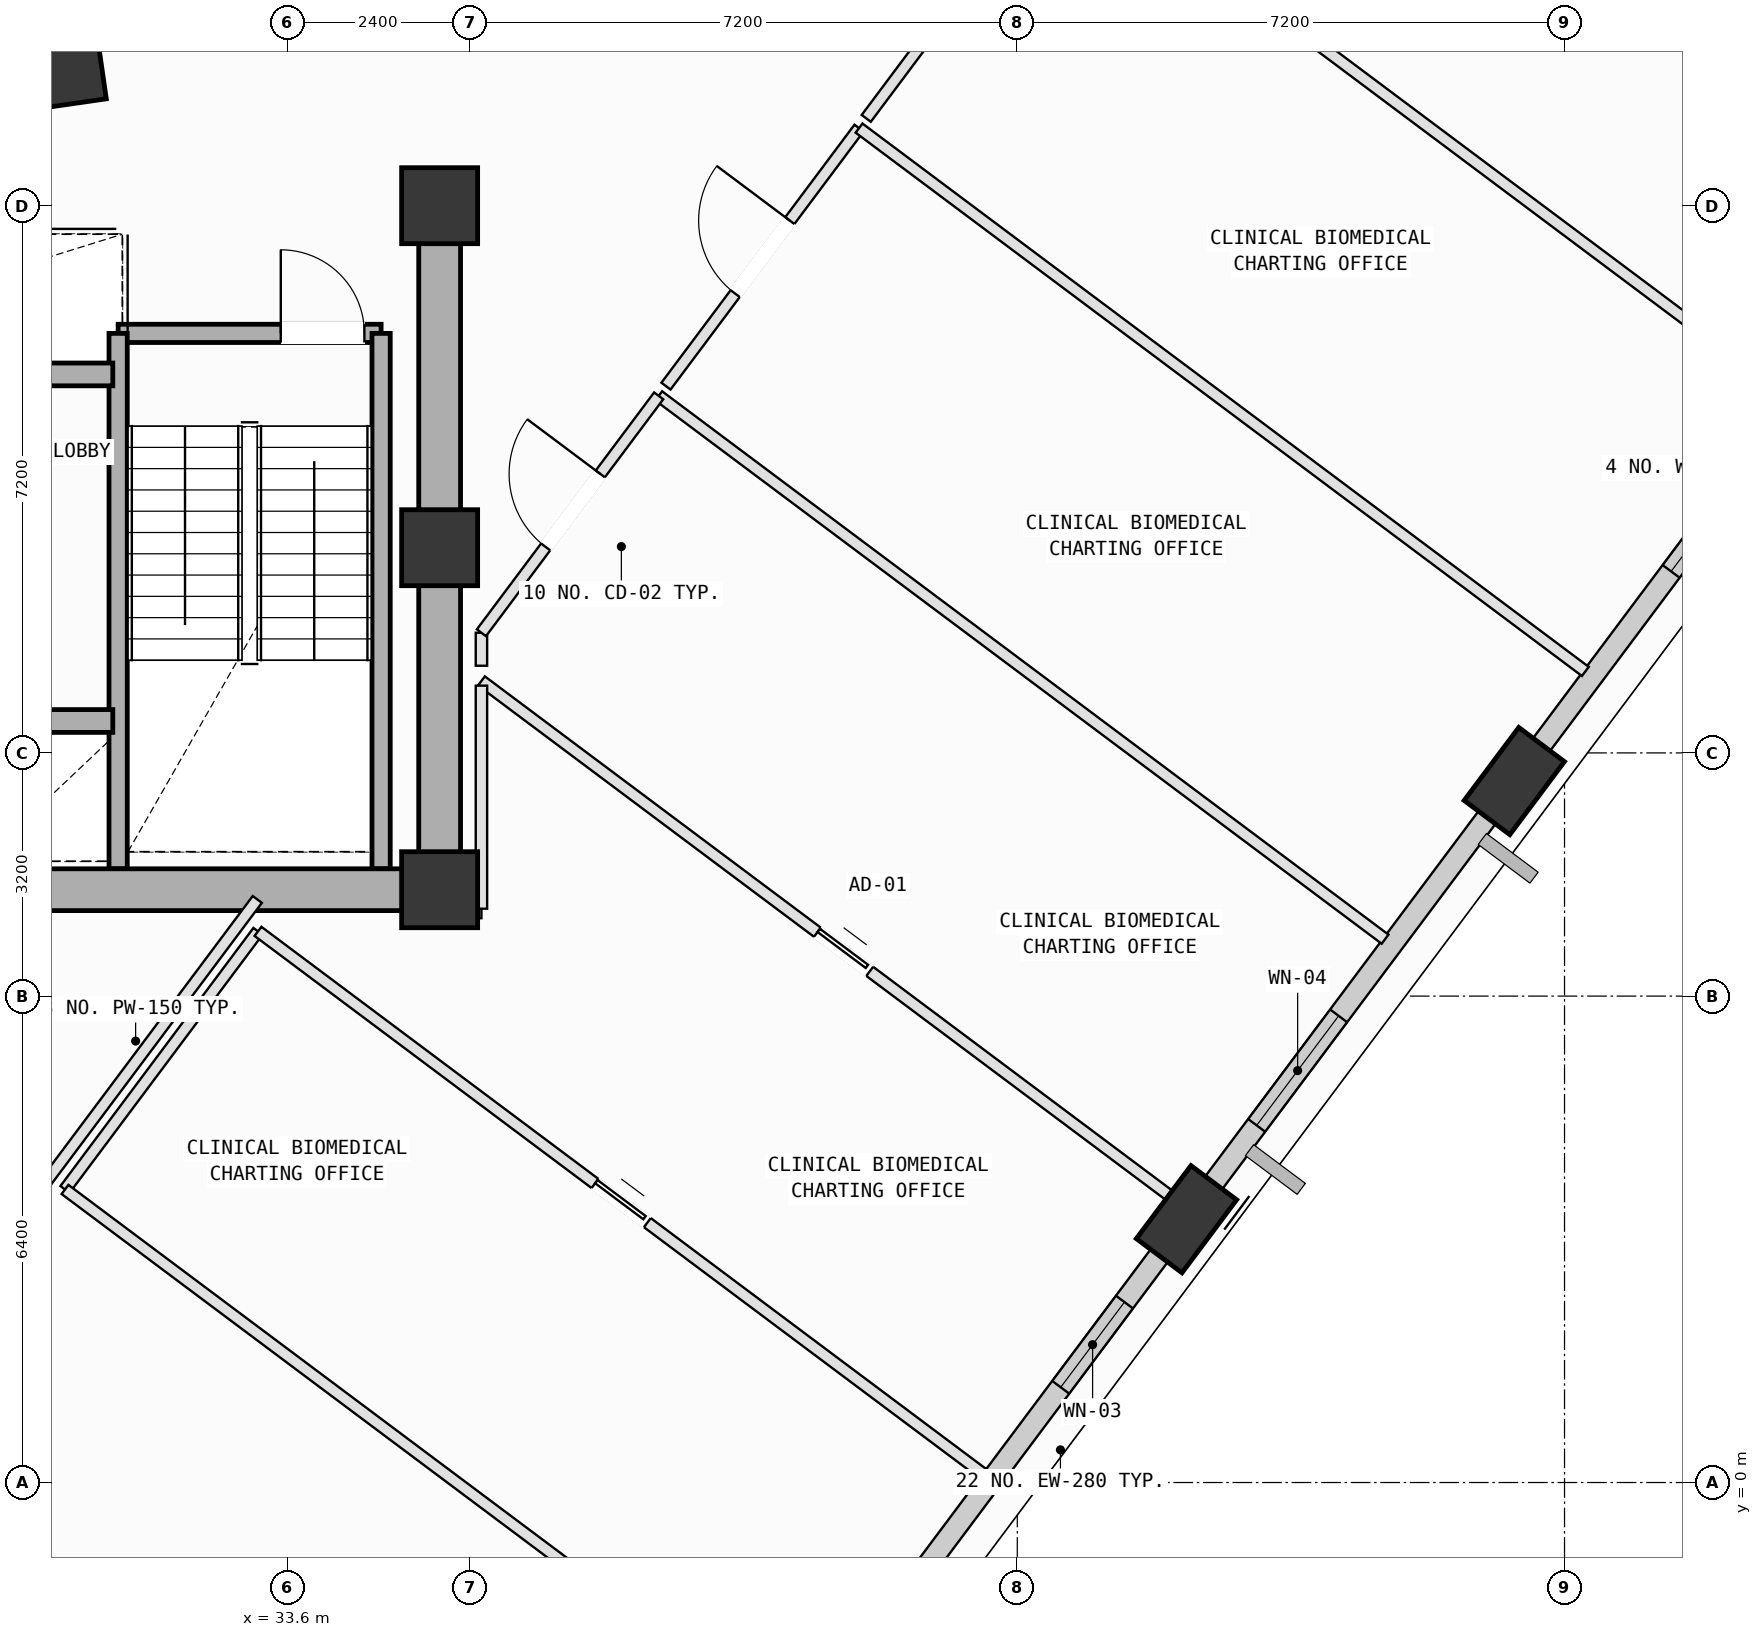
"""IFC4 building model, lengths in metres.
Left out: names, types, materials, properties, quantities, classifications, styles, units other than length and angle.
Written with IfcOpenShell. Run it as: python <this file> out.ifc"""

import sys

from ifc_helpers import new_model, si_unit, direction, frame, frame_2d, origin, origin_2d, place, context, subcontext, project, spatial, rectangle, extrude, element, fill, save


model = new_model("IFC4")
c1 = context("Model", 3, precision=1e-05, world=origin(), true_north=direction((0.0, 1.0)))
c2 = subcontext(c1, "Body", "Model", "MODEL_VIEW")
j1 = project(units=[si_unit("LENGTHUNIT", "METRE"), si_unit("PLANEANGLEUNIT", "RADIAN")], contexts=[c1])
p1 = place(None, origin())
s1 = spatial("IfcSite", under=j1, at=p1, CompositionType="ELEMENT")
p2 = place(p1, origin())
s2 = spatial("IfcBuilding", under=s1, at=p2, CompositionType="ELEMENT")
p3 = place(p2, frame((0.0, 0.0, 251.2)))
s3 = spatial("IfcBuildingStorey", under=s2, at=p3, CompositionType="ELEMENT", Elevation=251.2)
for number, where, z_axis, x_axis in (
    (1, (35.6, 7.8, 0.0), (0.0, 0.0, 1.0), (1.0, 0.0, 0.0)),
    (2, (35.6, 12.3, 0.0), (0.0, 0.0, 1.0), (1.0, 0.0, 0.0)),
    (3, (35.6, 16.8, 0.0), (0.0, 0.0, 1.0), (1.0, 0.0, 0.0)),
):
    element("IfcColumn", number, at=place(p3, frame(where, z_axis=z_axis, x_axis=x_axis)), inside=s3, PredefinedType="COLUMN", context=c2, shape_type="SweptSolid", body=[
        extrude(rectangle(XDim=1.0, YDim=1.0, at=origin_2d()), origin(), (0.0, 0.0, 1.0), 4.0),
    ])
p4 = place(p3, frame((45.426, 3.465, 0.002), z_axis=(0.087585718963, 0.049475902315, 0.994927573708), x_axis=(-0.988272356608, 0.12972919352, 0.080548653085)))
e4 = element("IfcColumn", 4, at=p4, inside=s3, PredefinedType="COLUMN", context=c2, shape_type="SweptSolid", body=[
    extrude(rectangle(XDim=1.2, YDim=0.75, at=origin_2d()), origin(), (0.0, 0.0, 1.0), 4.017),
])
p5 = place(p3, frame((49.739, 9.23, 0.002), z_axis=(0.063748411472, 0.067154815138, 0.995703957428), x_axis=(-0.983362673605, -0.165833326285, 0.074142835491)))
e5 = element("IfcColumn", 5, at=p5, inside=s3, PredefinedType="COLUMN", context=c2, shape_type="SweptSolid", body=[
    extrude(rectangle(XDim=1.2, YDim=0.75, at=origin_2d()), origin(), (0.0, 0.0, 1.0), 4.014),
])
p6 = place(p3, frame((30.757, 18.747, 0.002), z_axis=(0.025220894117, -0.011602832645, 0.999614566108), x_axis=(-0.958449756783, 0.283934892623, 0.027477999826)))
e6 = element("IfcColumn", 6, at=p6, inside=s3, PredefinedType="COLUMN", context=c2, shape_type="SweptSolid", body=[
    extrude(rectangle(XDim=1.2, YDim=0.75, at=origin_2d()), origin(), (0.0, 0.0, 1.0), 3.998),
])
p7 = place(p3, frame((45.304, 3.301, 0.0), z_axis=(0.0, 0.0, 1.0), x_axis=(-0.599010607172, -0.800741089551, 0.0)))
e7 = element("IfcWall", 7, at=p7, inside=s3, PredefinedType="SOLIDWALL", context=c2, shape_type="SweptSolid", body=[
    extrude(rectangle(XDim=6.438, YDim=0.28, at=frame_2d((3.219, 0.0))), origin(), (0.0, 0.0, 1.0), 3.265),
])
p8 = place(p7, frame((1.158, 0.0, 0.75)))
e8 = element("IfcOpeningElement", 8, at=p8, cuts=e7, PredefinedType="OPENING", context=c2, shape_type="SweptSolid", body=[
    extrude(rectangle(XDim=1.4, YDim=1.85, at=frame_2d((0.7, 0.925))), frame((0.0, 0.15, 0.0), z_axis=(0.0, -1.0, 0.0), x_axis=(1.0, 0.0, 0.0)), (0.0, 0.0, 1.0), 0.3),
])
p9 = place(p3, frame((49.612, 9.06, 0.0), z_axis=(0.0, 0.0, 1.0), x_axis=(-0.599018948846, -0.800734849325, 0.0)))
e9 = element("IfcWall", 9, at=p9, inside=s3, PredefinedType="SOLIDWALL", context=c2, shape_type="SweptSolid", body=[
    extrude(rectangle(XDim=6.414, YDim=0.28, at=frame_2d((3.207, 0.0))), origin(), (0.0, 0.0, 1.0), 3.265),
])
p10 = place(p9, frame((3.646, 0.0, 0.75)))
e10 = element("IfcOpeningElement", 10, at=p10, cuts=e9, PredefinedType="OPENING", context=c2, shape_type="SweptSolid", body=[
    extrude(rectangle(XDim=1.8, YDim=2.05, at=frame_2d((0.9, 1.025))), frame((0.0, 0.15, 0.0), z_axis=(0.0, -1.0, 0.0), x_axis=(1.0, 0.0, 0.0)), (0.0, 0.0, 1.0), 0.3),
])
p11 = place(p3, frame((53.925, 14.825, 0.0), z_axis=(0.0, 0.0, 1.0), x_axis=(-0.599030136661, -0.800726479749, 0.0)))
e11 = element("IfcWall", 11, at=p11, inside=s3, PredefinedType="SOLIDWALL", context=c2, shape_type="SweptSolid", body=[
    extrude(rectangle(XDim=6.407, YDim=0.28, at=frame_2d((3.203, 0.0))), origin(), (0.0, 0.0, 1.0), 3.265),
])
p12 = place(p11, frame((2.344, 0.0, 0.75)))
e12 = element("IfcOpeningElement", 12, at=p12, cuts=e11, PredefinedType="OPENING", context=c2, shape_type="SweptSolid", body=[
    extrude(rectangle(XDim=1.2, YDim=1.75, at=frame_2d((0.6, 0.875))), frame((0.0, 0.15, 0.0), z_axis=(0.0, -1.0, 0.0), x_axis=(1.0, 0.0, 0.0)), (0.0, 0.0, 1.0), 0.3),
])
p13 = place(p3, frame((31.37, 15.12, 0.0), z_axis=(0.0, 0.0, 1.0), x_axis=(1.0, 0.0, 0.0)))
e13 = element("IfcWall", 13, at=p13, inside=s3, PredefinedType="SOLIDWALL", context=c2, shape_type="SweptSolid", body=[
    extrude(rectangle(XDim=3.46, YDim=0.24, at=frame_2d((1.73, 0.0))), origin(), (0.0, 0.0, 1.0), 3.78),
])
p14 = place(p13, frame((2.14, 0.0, 0.0)))
e14 = element("IfcOpeningElement", 14, at=p14, cuts=e13, PredefinedType="OPENING", context=c2, shape_type="SweptSolid", body=[
    extrude(rectangle(XDim=1.1, YDim=2.15, at=frame_2d((0.55, 1.075))), frame((0.0, 0.13, 0.0), z_axis=(0.0, -1.0, 0.0), x_axis=(1.0, 0.0, 0.0)), (0.0, 0.0, 1.0), 0.26),
])
for number, where, z_axis, x_axis in (
    (15, (34.83, 15.12, 0.0), (0.0, 0.0, 1.0), (0.0, -1.0, 0.0)),
    (16, (31.37, 8.075, 0.0), (0.0, 0.0, 1.0), (0.0, 1.0, 0.0)),
):
    element("IfcWall", number, at=place(p3, frame(where, z_axis=z_axis, x_axis=x_axis)), inside=s3, PredefinedType="SOLIDWALL", context=c2, shape_type="SweptSolid", body=[
        extrude(rectangle(XDim=7.045, YDim=0.24, at=frame_2d((3.522, 0.0))), origin(), (0.0, 0.0, 1.0), 3.78),
    ])
p15 = place(p3, frame((24.8, 7.8, 0.0), z_axis=(0.0, 0.0, 1.0), x_axis=(1.0, 0.0, 0.0)))
e17 = element("IfcWall", 17, at=p15, inside=s3, PredefinedType="SHEAR", context=c2, shape_type="SweptSolid", body=[
    extrude(rectangle(XDim=10.8, YDim=0.55, at=frame_2d((5.4, 0.0))), origin(), (0.0, 0.0, 1.0), 3.78),
])
p16 = place(p3, frame((35.6, 7.8, 0.0), z_axis=(0.0, 0.0, 1.0), x_axis=(0.0, 1.0, 0.0)))
e18 = element("IfcWall", 18, at=p16, inside=s3, PredefinedType="SHEAR", context=c2, shape_type="SweptSolid", body=[
    extrude(rectangle(XDim=9.0, YDim=0.55, at=frame_2d((4.5, 0.0))), origin(), (0.0, 0.0, 1.0), 3.78),
])
p17 = place(p3, frame((29.6, 10.02, 0.0), z_axis=(0.0, 0.0, 1.0), x_axis=(1.0, 0.0, 0.0)))
e19 = element("IfcWall", 19, at=p17, inside=s3, PredefinedType="SOLIDWALL", context=c2, shape_type="SweptSolid", body=[
    extrude(rectangle(XDim=1.7, YDim=0.3, at=frame_2d((0.85, 0.0))), origin(), (0.0, 0.0, 1.0), 3.78),
])
p18 = place(p3, frame((25.85, 14.58, 0.0), z_axis=(0.0, 0.0, 1.0), x_axis=(1.0, 0.0, 0.0)))
e20 = element("IfcWall", 20, at=p18, inside=s3, PredefinedType="SOLIDWALL", context=c2, shape_type="SweptSolid", body=[
    extrude(rectangle(XDim=5.45, YDim=0.3, at=frame_2d((2.725, 0.0))), origin(), (0.0, 0.0, 1.0), 3.78),
])
p19 = place(p18, frame((0.34, 0.0, 0.0)))
e21 = element("IfcOpeningElement", 21, at=p19, cuts=e20, PredefinedType="OPENING", context=c2, shape_type="SweptSolid", body=[
    extrude(rectangle(XDim=1.12, YDim=2.15, at=frame_2d((0.56, 1.075))), frame((0.0, 0.16, 0.0), z_axis=(0.0, -1.0, 0.0), x_axis=(1.0, 0.0, 0.0)), (0.0, 0.0, 1.0), 0.32),
])
p20 = place(p18, frame((2.24, 0.0, 0.0)))
e22 = element("IfcOpeningElement", 22, at=p20, cuts=e20, PredefinedType="OPENING", context=c2, shape_type="SweptSolid", body=[
    extrude(rectangle(XDim=1.12, YDim=2.15, at=frame_2d((0.56, 1.075))), frame((0.0, 0.16, 0.0), z_axis=(0.0, -1.0, 0.0), x_axis=(1.0, 0.0, 0.0)), (0.0, 0.0, 1.0), 0.32),
])
p21 = place(p3, frame((30.671, 3.856, 0.0), z_axis=(0.0, 0.0, 1.0), x_axis=(0.598801724245, 0.800897306177, 0.0)))
e23 = element("IfcWall", 23, at=p21, inside=s3, PredefinedType="PARTITIONING", context=c2, shape_type="SweptSolid", body=[
    extrude(rectangle(XDim=4.24, YDim=0.15, at=frame_2d((2.12, 0.0))), origin(), (0.0, 0.0, 1.0), 3.78),
])
p22 = place(p3, frame((33.21, 7.252, 0.0), z_axis=(0.0, 0.0, 1.0), x_axis=(0.800721064426, -0.599037375282, 0.0)))
e24 = element("IfcWall", 24, at=p22, inside=s3, PredefinedType="PARTITIONING", context=c2, shape_type="SweptSolid", body=[
    extrude(rectangle(XDim=11.936, YDim=0.15, at=frame_2d((5.968, 0.0))), origin(), (0.0, 0.0, 1.0), 3.78),
])
p23 = place(p22, frame((5.538, 0.0, 0.0)))
e25 = element("IfcOpeningElement", 25, at=p23, cuts=e24, PredefinedType="OPENING", context=c2, shape_type="SweptSolid", body=[
    extrude(rectangle(XDim=0.86, YDim=2.06, at=frame_2d((0.43, 1.03))), frame((0.0, 0.085, 0.0), z_axis=(0.0, -1.0, 0.0), x_axis=(1.0, 0.0, 0.0)), (0.0, 0.0, 1.0), 0.17),
])
p24 = place(p3, frame((40.227, -3.293, 0.0), z_axis=(0.0, 0.0, 1.0), x_axis=(-0.800730950492, 0.599024160551, 0.0)))
e26 = element("IfcWall", 26, at=p24, inside=s3, PredefinedType="PARTITIONING", context=c2, shape_type="SweptSolid", body=[
    extrude(rectangle(XDim=11.934, YDim=0.15, at=frame_2d((5.967, 0.0))), origin(), (0.0, 0.0, 1.0), 3.78),
])
p25 = place(p3, frame((36.15, 10.547, 0.0), z_axis=(0.0, 0.0, 1.0), x_axis=(0.800750249999, -0.598998361539, 0.0)))
e27 = element("IfcWall", 27, at=p25, inside=s3, PredefinedType="PARTITIONING", context=c2, shape_type="SweptSolid", body=[
    extrude(rectangle(XDim=11.9, YDim=0.15, at=frame_2d((5.95, 0.0))), origin(), (0.0, 0.0, 1.0), 3.165),
])
p26 = place(p25, frame((5.52, 0.0, 0.0)))
e28 = element("IfcOpeningElement", 28, at=p26, cuts=e27, PredefinedType="OPENING", context=c2, shape_type="SweptSolid", body=[
    extrude(rectangle(XDim=0.86, YDim=2.06, at=frame_2d((0.43, 1.03))), frame((0.0, 0.085, 0.0), z_axis=(0.0, -1.0, 0.0), x_axis=(1.0, 0.0, 0.0)), (0.0, 0.0, 1.0), 0.17),
])
p27 = place(p3, frame((35.6, 7.5, 0.0), z_axis=(0.0, 0.0, 1.0), x_axis=(1.0, 0.0, 0.0)))
e29 = element("IfcWall", 29, at=p27, inside=s3, PredefinedType="PARTITIONING", context=c2, shape_type="SweptSolid", body=[
    extrude(rectangle(XDim=0.55, YDim=0.15, at=frame_2d((0.275, 0.0))), origin(), (0.0, 0.0, 1.0), 3.78),
])
p28 = place(p3, frame((36.15, 7.55, 0.0), z_axis=(0.0, 0.0, 1.0), x_axis=(0.0, 1.0, 0.0)))
e30 = element("IfcWall", 30, at=p28, inside=s3, PredefinedType="PARTITIONING", context=c2, shape_type="SweptSolid", body=[
    extrude(rectangle(XDim=2.935, YDim=0.15, at=frame_2d((1.468, 0.0))), origin(), (0.0, 0.0, 1.0), 3.78),
])
p29 = place(p3, frame((38.482, 14.298, 0.0), z_axis=(0.0, 0.0, 1.0), x_axis=(0.800750498609, -0.598998029193, 0.0)))
e31 = element("IfcWall", 31, at=p29, inside=s3, PredefinedType="PARTITIONING", context=c2, shape_type="SweptSolid", body=[
    extrude(rectangle(XDim=11.935, YDim=0.15, at=frame_2d((5.968, 0.0))), origin(), (0.0, 0.0, 1.0), 3.78),
])
p30 = place(p3, frame((36.15, 10.747, 0.0), z_axis=(0.0, 0.0, 1.0), x_axis=(0.0, 1.0, 0.0)))
e32 = element("IfcWall", 32, at=p30, inside=s3, PredefinedType="PARTITIONING", context=c2, shape_type="SweptSolid", body=[
    extrude(rectangle(XDim=0.434, YDim=0.15, at=frame_2d((0.217, 0.0))), origin(), (0.0, 0.0, 1.0), 3.78),
])
p31 = place(p3, frame((36.15, 11.181, 0.0), z_axis=(0.0, 0.0, 1.0), x_axis=(0.599036290611, 0.800721875892, 0.0)))
e33 = element("IfcWall", 33, at=p31, inside=s3, PredefinedType="PARTITIONING", context=c2, shape_type="SweptSolid", body=[
    extrude(rectangle(XDim=3.893, YDim=0.15, at=frame_2d((1.947, 0.0))), origin(), (0.0, 0.0, 1.0), 3.78),
])
p32 = place(p31, frame((1.41, 0.0, 0.0)))
e34 = element("IfcOpeningElement", 34, at=p32, cuts=e33, PredefinedType="OPENING", context=c2, shape_type="SweptSolid", body=[
    extrude(rectangle(XDim=1.2, YDim=2.15, at=frame_2d((0.6, 1.075))), frame((0.0, 0.085, 0.0), z_axis=(0.0, -1.0, 0.0), x_axis=(1.0, 0.0, 0.0)), (0.0, 0.0, 1.0), 0.17),
])
p33 = place(p3, frame((38.578, 14.426, 0.0), z_axis=(0.0, 0.0, 1.0), x_axis=(0.599059884296, 0.800704224435, 0.0)))
e35 = element("IfcWall", 35, at=p33, inside=s3, PredefinedType="PARTITIONING", context=c2, shape_type="SweptSolid", body=[
    extrude(rectangle(XDim=4.24, YDim=0.15, at=frame_2d((2.12, 0.0))), origin(), (0.0, 0.0, 1.0), 3.78),
])
p34 = place(p33, frame((1.52, 0.0, 0.0)))
e36 = element("IfcOpeningElement", 36, at=p34, cuts=e35, PredefinedType="OPENING", context=c2, shape_type="SweptSolid", body=[
    extrude(rectangle(XDim=1.2, YDim=2.15, at=frame_2d((0.6, 1.075))), frame((0.0, 0.085, 0.0), z_axis=(0.0, -1.0, 0.0), x_axis=(1.0, 0.0, 0.0)), (0.0, 0.0, 1.0), 0.17),
])
p35 = place(p3, frame((41.118, 17.821, 0.0), z_axis=(0.0, 0.0, 1.0), x_axis=(0.800730950492, -0.599024160551, 0.0)))
e37 = element("IfcWall", 37, at=p35, inside=s3, PredefinedType="PARTITIONING", context=c2, shape_type="SweptSolid", body=[
    extrude(rectangle(XDim=11.934, YDim=0.15, at=frame_2d((5.967, 0.0))), origin(), (0.0, 0.0, 1.0), 3.78),
])
p36 = place(p3, frame((50.272, 9.557, 0.0), z_axis=(0.0, 0.0, 1.0), x_axis=(-0.6, -0.8, 0.0)))
e38 = element("IfcWall", 38, at=p36, inside=s3, PredefinedType="PARTITIONING", context=c2, shape_type="SweptSolid", body=[
    extrude(rectangle(XDim=0.793, YDim=0.15, at=frame_2d((0.397, 0.0))), origin(), (0.0, 0.0, 1.0), 3.265),
])
p37 = place(p3, frame((41.213, 17.949, 0.0), z_axis=(0.0, 0.0, 1.0), x_axis=(0.599081575716, 0.800687995187, 0.0)))
e39 = element("IfcWall", 39, at=p37, inside=s3, PredefinedType="PARTITIONING", context=c2, shape_type="SweptSolid", body=[
    extrude(rectangle(XDim=4.34, YDim=0.15, at=frame_2d((2.17, 0.0))), origin(), (0.0, 0.0, 1.0), 3.78),
])
p38 = place(p37, frame((1.57, 0.0, 0.0)))
e40 = element("IfcOpeningElement", 40, at=p38, cuts=e39, PredefinedType="OPENING", context=c2, shape_type="SweptSolid", body=[
    extrude(rectangle(XDim=1.2, YDim=2.15, at=frame_2d((0.6, 1.075))), frame((0.0, 0.085, 0.0), z_axis=(0.0, -1.0, 0.0), x_axis=(1.0, 0.0, 0.0)), (0.0, 0.0, 1.0), 0.17),
])
p39 = place(p3, frame((43.813, 21.424, 0.0), z_axis=(0.0, 0.0, 1.0), x_axis=(0.800750498609, -0.598998029193, 0.0)))
e41 = element("IfcWall", 41, at=p39, inside=s3, PredefinedType="PARTITIONING", context=c2, shape_type="SweptSolid", body=[
    extrude(rectangle(XDim=11.935, YDim=0.15, at=frame_2d((5.968, 0.0))), origin(), (0.0, 0.0, 1.0), 3.78),
])
p40 = place(p3, frame((46.509, 25.028, 0.0), z_axis=(0.0, 0.0, 1.0), x_axis=(0.800743159028, -0.599007840741, 0.0)))
e42 = element("IfcWall", 42, at=p40, inside=s3, PredefinedType="PARTITIONING", context=c2, shape_type="SweptSolid", body=[
    extrude(rectangle(XDim=11.935, YDim=0.15, at=frame_2d((5.968, 0.0))), origin(), (0.0, 0.0, 1.0), 3.78),
])
p41 = place(p3, frame((33.201, 7.672, 0.0), z_axis=(0.0, 0.0, 1.0), x_axis=(-0.5990566524, -0.80070664242, 0.0)))
e43 = element("IfcWall", 43, at=p41, inside=s3, PredefinedType="PARTITIONING", context=c2, shape_type="SweptSolid", body=[
    extrude(rectangle(XDim=13.381, YDim=0.15, at=frame_2d((6.69, 0.0))), origin(), (0.0, 0.0, 1.0), 3.78),
])
p42 = place(p8, origin())
e44 = element("IfcWindow", 44, at=p42, inside=s3, PartitioningType="SINGLE_PANEL", PredefinedType="WINDOW", context=c2, shape_type="SweptSolid", body=[
    extrude(rectangle(XDim=1.4, YDim=1.85, at=frame_2d((0.7, 0.925))), frame((0.0, 0.03, 0.0), z_axis=(0.0, -1.0, 0.0), x_axis=(1.0, 0.0, 0.0)), (0.0, 0.0, 1.0), 0.06),
])
fill(e8, e44)
p43 = place(p10, origin())
e45 = element("IfcWindow", 45, at=p43, inside=s3, PartitioningType="SINGLE_PANEL", PredefinedType="WINDOW", context=c2, shape_type="SweptSolid", body=[
    extrude(rectangle(XDim=1.8, YDim=2.05, at=frame_2d((0.9, 1.025))), frame((0.0, 0.03, 0.0), z_axis=(0.0, -1.0, 0.0), x_axis=(1.0, 0.0, 0.0)), (0.0, 0.0, 1.0), 0.06),
])
fill(e10, e45)
p44 = place(p12, origin())
e46 = element("IfcWindow", 46, at=p44, inside=s3, PartitioningType="SINGLE_PANEL", PredefinedType="WINDOW", context=c2, shape_type="SweptSolid", body=[
    extrude(rectangle(XDim=1.2, YDim=1.75, at=frame_2d((0.6, 0.875))), frame((0.0, 0.03, 0.0), z_axis=(0.0, -1.0, 0.0), x_axis=(1.0, 0.0, 0.0)), (0.0, 0.0, 1.0), 0.06),
])
fill(e12, e46)
p45 = place(p14, origin())
e47 = element("IfcDoor", 47, at=p45, inside=s3, OperationType="SINGLE_SWING_LEFT", PredefinedType="DOOR", context=c2, shape_type="SweptSolid", body=[
    extrude(rectangle(XDim=1.1, YDim=2.15, at=frame_2d((0.55, 1.075))), frame((0.0, 0.025, 0.0), z_axis=(0.0, -1.0, 0.0), x_axis=(1.0, 0.0, 0.0)), (0.0, 0.0, 1.0), 0.05),
])
fill(e14, e47)
p46 = place(p32, origin())
e48 = element("IfcDoor", 48, at=p46, inside=s3, OperationType="SINGLE_SWING_RIGHT", PredefinedType="DOOR", context=c2, shape_type="SweptSolid", body=[
    extrude(rectangle(XDim=1.2, YDim=2.15, at=frame_2d((0.6, 1.075))), frame((0.0, 0.025, 0.0), z_axis=(0.0, -1.0, 0.0), x_axis=(1.0, 0.0, 0.0)), (0.0, 0.0, 1.0), 0.05),
])
fill(e34, e48)
p47 = place(p34, origin())
e49 = element("IfcDoor", 49, at=p47, inside=s3, OperationType="SINGLE_SWING_RIGHT", PredefinedType="DOOR", context=c2, shape_type="SweptSolid", body=[
    extrude(rectangle(XDim=1.2, YDim=2.15, at=frame_2d((0.6, 1.075))), frame((0.0, 0.025, 0.0), z_axis=(0.0, -1.0, 0.0), x_axis=(1.0, 0.0, 0.0)), (0.0, 0.0, 1.0), 0.05),
])
fill(e36, e49)
p48 = place(p26, origin())
e50 = element("IfcDoor", 50, at=p48, inside=s3, OperationType="SLIDING_TO_LEFT", PredefinedType="DOOR", context=c2, shape_type="SweptSolid", body=[
    extrude(rectangle(XDim=0.86, YDim=2.06, at=frame_2d((0.43, 1.03))), frame((0.0, 0.025, 0.0), z_axis=(0.0, -1.0, 0.0), x_axis=(1.0, 0.0, 0.0)), (0.0, 0.0, 1.0), 0.05),
])
fill(e28, e50)
p49 = place(p23, origin())
e51 = element("IfcDoor", 51, at=p49, inside=s3, OperationType="SLIDING_TO_LEFT", PredefinedType="DOOR", context=c2, shape_type="SweptSolid", body=[
    extrude(rectangle(XDim=0.86, YDim=2.06, at=frame_2d((0.43, 1.03))), frame((0.0, 0.025, 0.0), z_axis=(0.0, -1.0, 0.0), x_axis=(1.0, 0.0, 0.0)), (0.0, 0.0, 1.0), 0.05),
])
fill(e25, e51)
save(model, sys.argv[1])
